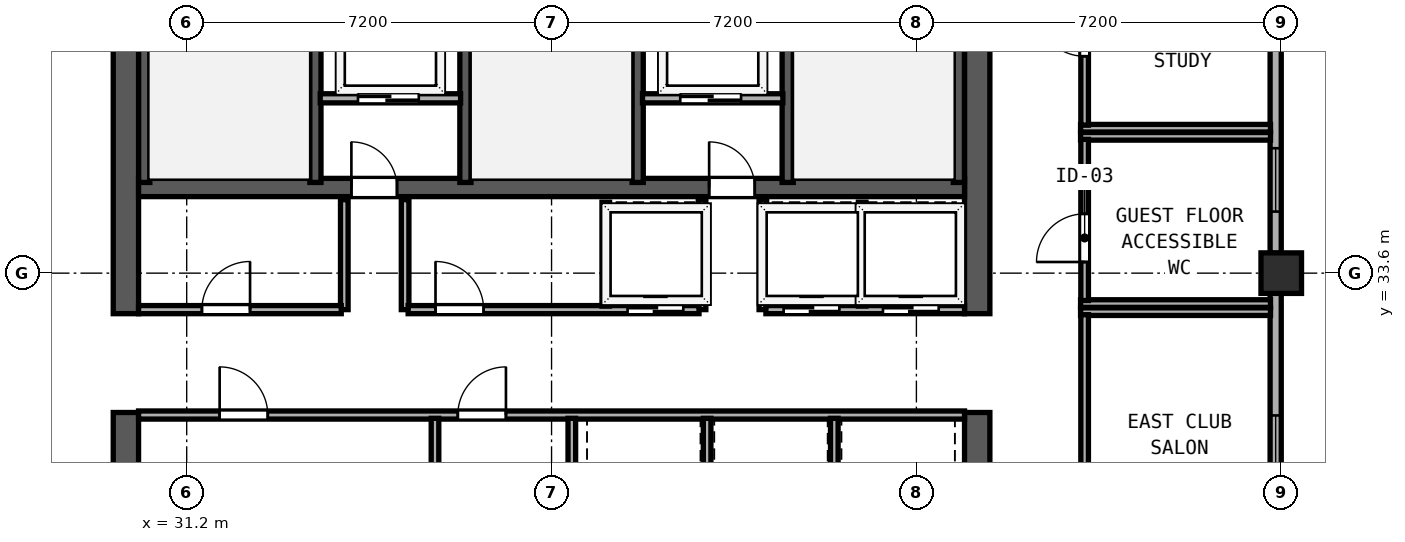
"""IFC4 building model, lengths in metres.
Left out: names, types, materials, properties, quantities, classifications, styles, units other than length and angle.
Written with IfcOpenShell. Run it as: python <this file> out.ifc"""

import sys

from ifc_helpers import new_model, si_unit, direction, frame, frame_2d, origin, origin_2d, place, context, subcontext, project, spatial, rectangle, hollow_rectangle, extrude, element, fill, save


model = new_model("IFC4")
c1 = context("Model", 3, precision=1e-05, world=origin(), true_north=direction((0.0, 1.0)))
c2 = subcontext(c1, "Body", "Model", "MODEL_VIEW")
j1 = project(units=[si_unit("LENGTHUNIT", "METRE"), si_unit("PLANEANGLEUNIT", "RADIAN")], contexts=[c1])
p1 = place(None, origin())
s1 = spatial("IfcSite", under=j1, at=p1, CompositionType="ELEMENT")
p2 = place(p1, origin())
s2 = spatial("IfcBuilding", under=s1, at=p2, CompositionType="ELEMENT")
p3 = place(p2, frame((0.0, 0.0, 258.3)))
s3 = spatial("IfcBuildingStorey", under=s2, at=p3, CompositionType="ELEMENT", Elevation=258.3)
p4 = place(p3, frame((30.0, 26.65, 0.0), z_axis=(0.0, 0.0, 1.0), x_axis=(0.0, 1.0, 0.0)))
e1 = element("IfcWall", 1, at=p4, inside=s3, PredefinedType="SHEAR", context=c2, shape_type="SweptSolid", body=[
    extrude(rectangle(XDim=4.2, YDim=0.5, at=frame_2d((2.1, 0.0))), origin(), (0.0, 0.0, 1.0), 3.67),
])
p5 = place(p3, frame((30.0, 32.8, 0.0), z_axis=(0.0, 0.0, 1.0), x_axis=(0.0, 1.0, 0.0)))
e2 = element("IfcWall", 2, at=p5, inside=s3, PredefinedType="SHEAR", context=c2, shape_type="SweptSolid", body=[
    extrude(rectangle(XDim=10.15, YDim=0.5, at=frame_2d((5.075, 0.0))), origin(), (0.0, 0.0, 1.0), 3.67),
])
p6 = place(p3, frame((46.8, 26.65, 0.0), z_axis=(0.0, 0.0, 1.0), x_axis=(0.0, 1.0, 0.0)))
e3 = element("IfcWall", 3, at=p6, inside=s3, PredefinedType="SHEAR", context=c2, shape_type="SweptSolid", body=[
    extrude(rectangle(XDim=4.2, YDim=0.5, at=frame_2d((2.1, 0.0))), origin(), (0.0, 0.0, 1.0), 3.67),
])
p7 = place(p3, frame((46.8, 32.8, 0.0), z_axis=(0.0, 0.0, 1.0), x_axis=(0.0, 1.0, 0.0)))
e4 = element("IfcWall", 4, at=p7, inside=s3, PredefinedType="SHEAR", context=c2, shape_type="SweptSolid", body=[
    extrude(rectangle(XDim=10.15, YDim=0.5, at=frame_2d((5.075, 0.0))), origin(), (0.0, 0.0, 1.0), 3.67),
])
p8 = place(p3, frame((30.25, 35.29, 0.0), z_axis=(0.0, 0.0, 1.0), x_axis=(1.0, 0.0, 0.0)))
e5 = element("IfcWall", 5, at=p8, inside=s3, PredefinedType="SHEAR", context=c2, shape_type="SweptSolid", body=[
    extrude(rectangle(XDim=16.3, YDim=0.36, at=frame_2d((8.15, 0.0))), origin(), (0.0, 0.0, 1.0), 3.67),
])
p9 = place(p8, frame((5.1, 0.0, 0.0), z_axis=(0.0, 0.0, 1.0), x_axis=(-1.0, 0.0, 0.0)))
e6 = element("IfcOpeningElement", 6, at=p9, cuts=e5, PredefinedType="OPENING", context=c2, shape_type="SweptSolid", body=[
    extrude(rectangle(XDim=0.9, YDim=2.1, at=frame_2d((0.45, 1.05))), frame((0.0, 0.19, 0.0), z_axis=(0.0, -1.0, 0.0), x_axis=(1.0, 0.0, 0.0)), (0.0, 0.0, 1.0), 0.38),
])
p10 = place(p8, frame((12.16, 0.0, 0.0), z_axis=(0.0, 0.0, 1.0), x_axis=(-1.0, 0.0, 0.0)))
e7 = element("IfcOpeningElement", 7, at=p10, cuts=e5, PredefinedType="OPENING", context=c2, shape_type="SweptSolid", body=[
    extrude(rectangle(XDim=0.9, YDim=2.1, at=frame_2d((0.45, 1.05))), frame((0.0, 0.19, 0.0), z_axis=(0.0, -1.0, 0.0), x_axis=(1.0, 0.0, 0.0)), (0.0, 0.0, 1.0), 0.38),
])
for number, where, z_axis, x_axis in (
    (8, (30.362, 35.39, 0.0), (0.0, 0.0, 1.0), (0.0, 1.0, 0.0)),
    (9, (33.74, 35.39, 0.0), (0.0, 0.0, 1.0), (0.0, 1.0, 0.0)),
    (10, (36.7, 35.39, 0.0), (0.0, 0.0, 1.0), (0.0, 1.0, 0.0)),
    (11, (40.1, 35.39, 0.0), (0.0, 0.0, 1.0), (0.0, 1.0, 0.0)),
    (12, (43.06, 35.39, 0.0), (0.0, 0.0, 1.0), (0.0, 1.0, 0.0)),
    (13, (46.438, 35.39, 0.0), (0.0, 0.0, 1.0), (0.0, 1.0, 0.0)),
):
    element("IfcWall", number, at=place(p3, frame(where, z_axis=z_axis, x_axis=x_axis)), inside=s3, PredefinedType="SHEAR", context=c2, shape_type="SweptSolid", body=[
        extrude(rectangle(XDim=7.56, YDim=0.22, at=frame_2d((3.78, 0.0))), origin(), (0.0, 0.0, 1.0), 3.67),
    ])
p11 = place(p3, frame((52.8, 33.6, 0.0), z_axis=(0.0, 0.0, 1.0), x_axis=(1.0, 0.0, 0.0)))
e14 = element("IfcColumn", 14, at=p11, inside=s3, PredefinedType="COLUMN", context=c2, shape_type="SweptSolid", body=[
    extrude(hollow_rectangle(XDim=0.8, YDim=0.8, WallThickness=0.03, at=origin_2d()), origin(), (0.0, 0.0, 1.0), 3.85),
])
p12 = place(p3, frame((52.69, 27.942, 0.0), z_axis=(0.0, 0.0, 1.0), x_axis=(0.0, 1.0, 0.0)))
e15 = element("IfcWall", 15, at=p12, inside=s3, PredefinedType="SOLIDWALL", context=c2, shape_type="SweptSolid", body=[
    extrude(rectangle(XDim=5.266, YDim=0.22, at=frame_2d((2.633, 0.0))), origin(), (0.0, 0.0, 1.0), 3.315),
])
p13 = place(p12, frame((1.6, 0.0, 0.85)))
e16 = element("IfcOpeningElement", 16, at=p13, cuts=e15, PredefinedType="OPENING", context=c2, shape_type="SweptSolid", body=[
    extrude(rectangle(XDim=1.25, YDim=1.95, at=frame_2d((0.625, 0.975))), frame((0.0, 0.12, 0.0), z_axis=(0.0, -1.0, 0.0), x_axis=(1.0, 0.0, 0.0)), (0.0, 0.0, 1.0), 0.24),
])
p14 = place(p3, frame((52.69, 33.992, 0.0), z_axis=(0.0, 0.0, 1.0), x_axis=(0.0, 1.0, 0.0)))
e17 = element("IfcWall", 17, at=p14, inside=s3, PredefinedType="SOLIDWALL", context=c2, shape_type="SweptSolid", body=[
    extrude(rectangle(XDim=5.266, YDim=0.22, at=frame_2d((2.633, 0.0))), origin(), (0.0, 0.0, 1.0), 3.315),
])
p15 = place(p14, frame((0.823, 0.0, 0.85)))
e18 = element("IfcOpeningElement", 18, at=p15, cuts=e17, PredefinedType="OPENING", context=c2, shape_type="SweptSolid", body=[
    extrude(rectangle(XDim=1.25, YDim=1.95, at=frame_2d((0.625, 0.975))), frame((0.0, 0.12, 0.0), z_axis=(0.0, -1.0, 0.0), x_axis=(1.0, 0.0, 0.0)), (0.0, 0.0, 1.0), 0.24),
])
p16 = place(p3, frame((33.835, 37.05, 0.0), z_axis=(0.0, 0.0, 1.0), x_axis=(1.0, 0.0, 0.0)))
e19 = element("IfcWall", 19, at=p16, inside=s3, PredefinedType="SOLIDWALL", context=c2, shape_type="SweptSolid", body=[
    extrude(rectangle(XDim=2.77, YDim=0.18, at=frame_2d((1.385, 0.0))), origin(), (0.0, 0.0, 1.0), 3.67),
])
p17 = place(p16, frame((1.945, 0.0, 0.0), z_axis=(0.0, 0.0, 1.0), x_axis=(-1.0, 0.0, 0.0)))
e20 = element("IfcOpeningElement", 20, at=p17, cuts=e19, PredefinedType="OPENING", context=c2, shape_type="SweptSolid", body=[
    extrude(rectangle(XDim=1.2, YDim=2.2, at=frame_2d((0.6, 1.1))), frame((0.0, 0.1, 0.0), z_axis=(0.0, -1.0, 0.0), x_axis=(1.0, 0.0, 0.0)), (0.0, 0.0, 1.0), 0.2),
])
for number, where, z_axis, x_axis in (
    (21, (34.31, 32.88, 0.0), (0.0, 0.0, 1.0), (0.0, 1.0, 0.0)),
    (22, (35.51, 32.88, 0.0), (0.0, 0.0, 1.0), (0.0, 1.0, 0.0)),
):
    element("IfcWall", number, at=place(p3, frame(where, z_axis=z_axis, x_axis=x_axis)), inside=s3, PredefinedType="SOLIDWALL", context=c2, shape_type="SweptSolid", body=[
        extrude(rectangle(XDim=2.17, YDim=0.15, at=frame_2d((1.085, 0.0))), origin(), (0.0, 0.0, 1.0), 3.67),
    ])
p18 = place(p3, frame((40.195, 37.05, 0.0), z_axis=(0.0, 0.0, 1.0), x_axis=(1.0, 0.0, 0.0)))
e23 = element("IfcWall", 23, at=p18, inside=s3, PredefinedType="SOLIDWALL", context=c2, shape_type="SweptSolid", body=[
    extrude(rectangle(XDim=2.77, YDim=0.18, at=frame_2d((1.385, 0.0))), origin(), (0.0, 0.0, 1.0), 3.67),
])
p19 = place(p18, frame((1.945, 0.0, 0.0), z_axis=(0.0, 0.0, 1.0), x_axis=(-1.0, 0.0, 0.0)))
e24 = element("IfcOpeningElement", 24, at=p19, cuts=e23, PredefinedType="OPENING", context=c2, shape_type="SweptSolid", body=[
    extrude(rectangle(XDim=1.2, YDim=2.2, at=frame_2d((0.6, 1.1))), frame((0.0, 0.1, 0.0), z_axis=(0.0, -1.0, 0.0), x_axis=(1.0, 0.0, 0.0)), (0.0, 0.0, 1.0), 0.2),
])
for number, where, z_axis, x_axis in (
    (25, (41.37, 32.88, 0.0), (0.0, 0.0, 1.0), (0.0, 1.0, 0.0)),
    (26, (42.57, 32.88, 0.0), (0.0, 0.0, 1.0), (0.0, 1.0, 0.0)),
):
    element("IfcWall", number, at=place(p3, frame(where, z_axis=z_axis, x_axis=x_axis)), inside=s3, PredefinedType="SOLIDWALL", context=c2, shape_type="SweptSolid", body=[
        extrude(rectangle(XDim=2.17, YDim=0.15, at=frame_2d((1.085, 0.0))), origin(), (0.0, 0.0, 1.0), 3.67),
    ])
p20 = place(p3, frame((30.25, 32.88, 0.0), z_axis=(0.0, 0.0, 1.0), x_axis=(1.0, 0.0, 0.0)))
e27 = element("IfcWall", 27, at=p20, inside=s3, PredefinedType="SOLIDWALL", context=c2, shape_type="SweptSolid", body=[
    extrude(rectangle(XDim=4.0, YDim=0.16, at=frame_2d((2.0, 0.0))), origin(), (0.0, 0.0, 1.0), 3.67),
])
p21 = place(p20, frame((2.2, 0.0, 0.0), z_axis=(0.0, 0.0, 1.0), x_axis=(-1.0, 0.0, 0.0)))
e28 = element("IfcOpeningElement", 28, at=p21, cuts=e27, PredefinedType="OPENING", context=c2, shape_type="SweptSolid", body=[
    extrude(rectangle(XDim=0.95, YDim=2.12, at=frame_2d((0.475, 1.06))), frame((0.0, 0.09, 0.0), z_axis=(0.0, -1.0, 0.0), x_axis=(1.0, 0.0, 0.0)), (0.0, 0.0, 1.0), 0.18),
])
p22 = place(p3, frame((35.57, 32.88, 0.0), z_axis=(0.0, 0.0, 1.0), x_axis=(1.0, 0.0, 0.0)))
e29 = element("IfcWall", 29, at=p22, inside=s3, PredefinedType="SOLIDWALL", context=c2, shape_type="SweptSolid", body=[
    extrude(rectangle(XDim=5.74, YDim=0.16, at=frame_2d((2.87, 0.0))), origin(), (0.0, 0.0, 1.0), 3.67),
])
p23 = place(p22, frame((1.49, 0.0, 0.0), z_axis=(0.0, 0.0, 1.0), x_axis=(-1.0, 0.0, 0.0)))
e30 = element("IfcOpeningElement", 30, at=p23, cuts=e29, PredefinedType="OPENING", context=c2, shape_type="SweptSolid", body=[
    extrude(rectangle(XDim=0.95, YDim=2.12, at=frame_2d((0.475, 1.06))), frame((0.0, 0.09, 0.0), z_axis=(0.0, -1.0, 0.0), x_axis=(1.0, 0.0, 0.0)), (0.0, 0.0, 1.0), 0.18),
])
p24 = place(p22, frame((5.43, 0.0, 0.0), z_axis=(0.0, 0.0, 1.0), x_axis=(-1.0, 0.0, 0.0)))
e31 = element("IfcOpeningElement", 31, at=p24, cuts=e29, PredefinedType="OPENING", context=c2, shape_type="SweptSolid", body=[
    extrude(rectangle(XDim=1.1, YDim=2.2, at=frame_2d((0.55, 1.1))), frame((0.0, 0.09, 0.0), z_axis=(0.0, -1.0, 0.0), x_axis=(1.0, 0.0, 0.0)), (0.0, 0.0, 1.0), 0.18),
])
p25 = place(p3, frame((42.63, 32.88, 0.0), z_axis=(0.0, 0.0, 1.0), x_axis=(1.0, 0.0, 0.0)))
e32 = element("IfcWall", 32, at=p25, inside=s3, PredefinedType="SOLIDWALL", context=c2, shape_type="SweptSolid", body=[
    extrude(rectangle(XDim=3.92, YDim=0.16, at=frame_2d((1.96, 0.0))), origin(), (0.0, 0.0, 1.0), 3.67),
])
p26 = place(p25, frame((1.45, 0.0, 0.0), z_axis=(0.0, 0.0, 1.0), x_axis=(-1.0, 0.0, 0.0)))
e33 = element("IfcOpeningElement", 33, at=p26, cuts=e32, PredefinedType="OPENING", context=c2, shape_type="SweptSolid", body=[
    extrude(rectangle(XDim=1.1, YDim=2.2, at=frame_2d((0.55, 1.1))), frame((0.0, 0.09, 0.0), z_axis=(0.0, -1.0, 0.0), x_axis=(1.0, 0.0, 0.0)), (0.0, 0.0, 1.0), 0.18),
])
p27 = place(p25, frame((3.41, 0.0, 0.0), z_axis=(0.0, 0.0, 1.0), x_axis=(-1.0, 0.0, 0.0)))
e34 = element("IfcOpeningElement", 34, at=p27, cuts=e32, PredefinedType="OPENING", context=c2, shape_type="SweptSolid", body=[
    extrude(rectangle(XDim=1.1, YDim=2.2, at=frame_2d((0.55, 1.1))), frame((0.0, 0.09, 0.0), z_axis=(0.0, -1.0, 0.0), x_axis=(1.0, 0.0, 0.0)), (0.0, 0.0, 1.0), 0.18),
])
for number, where, z_axis, x_axis in (
    (35, (39.47, 32.95, 0.0), (0.0, 0.0, 1.0), (0.0, 1.0, 0.0)),
    (36, (44.53, 32.95, 0.0), (0.0, 0.0, 1.0), (0.0, 1.0, 0.0)),
):
    element("IfcWall", number, at=place(p3, frame(where, z_axis=z_axis, x_axis=x_axis)), inside=s3, PredefinedType="SOLIDWALL", context=c2, shape_type="SweptSolid", body=[
        extrude(rectangle(XDim=2.05, YDim=0.15, at=frame_2d((1.025, 0.0))), origin(), (0.0, 0.0, 1.0), 3.67),
    ])
p28 = place(p3, frame((30.25, 30.8, 0.0), z_axis=(0.0, 0.0, 1.0), x_axis=(1.0, 0.0, 0.0)))
e37 = element("IfcWall", 37, at=p28, inside=s3, PredefinedType="SOLIDWALL", context=c2, shape_type="SweptSolid", body=[
    extrude(rectangle(XDim=16.3, YDim=0.16, at=frame_2d((8.15, 0.0))), origin(), (0.0, 0.0, 1.0), 3.67),
])
p29 = place(p28, frame((1.6, 0.0, 0.0)))
e38 = element("IfcOpeningElement", 38, at=p29, cuts=e37, PredefinedType="OPENING", context=c2, shape_type="SweptSolid", body=[
    extrude(rectangle(XDim=0.95, YDim=2.12, at=frame_2d((0.475, 1.06))), frame((0.0, 0.09, 0.0), z_axis=(0.0, -1.0, 0.0), x_axis=(1.0, 0.0, 0.0)), (0.0, 0.0, 1.0), 0.18),
])
p30 = place(p28, frame((6.3, 0.0, 0.0)))
e39 = element("IfcOpeningElement", 39, at=p30, cuts=e37, PredefinedType="OPENING", context=c2, shape_type="SweptSolid", body=[
    extrude(rectangle(XDim=0.95, YDim=2.12, at=frame_2d((0.475, 1.06))), frame((0.0, 0.09, 0.0), z_axis=(0.0, -1.0, 0.0), x_axis=(1.0, 0.0, 0.0)), (0.0, 0.0, 1.0), 0.18),
])
p31 = place(p3, frame((38.8, 26.66, 0.0), z_axis=(0.0, 0.0, 1.0), x_axis=(0.0, 1.0, 0.0)))
e40 = element("IfcWall", 40, at=p31, inside=s3, PredefinedType="SOLIDWALL", context=c2, shape_type="SweptSolid", body=[
    extrude(rectangle(XDim=4.075, YDim=0.15, at=frame_2d((2.038, 0.0))), origin(), (0.0, 0.0, 1.0), 3.67),
])
p32 = place(p3, frame((36.1, 26.66, 0.0), z_axis=(0.0, 0.0, 1.0), x_axis=(0.0, 1.0, 0.0)))
e41 = element("IfcWall", 41, at=p32, inside=s3, PredefinedType="PARTITIONING", context=c2, shape_type="SweptSolid", body=[
    extrude(rectangle(XDim=4.075, YDim=0.15, at=frame_2d((2.038, 0.0))), origin(), (0.0, 0.0, 1.0), 3.67),
])
for number, where, z_axis, x_axis in (
    (42, (41.47, 28.75, 0.0), (0.0, 0.0, 1.0), (0.0, 1.0, 0.0)),
    (43, (43.98, 28.75, 0.0), (0.0, 0.0, 1.0), (0.0, 1.0, 0.0)),
):
    element("IfcWall", number, at=place(p3, frame(where, z_axis=z_axis, x_axis=x_axis)), inside=s3, PredefinedType="SOLIDWALL", context=c2, shape_type="SweptSolid", body=[
        extrude(rectangle(XDim=1.985, YDim=0.15, at=frame_2d((0.993, 0.0))), origin(), (0.0, 0.0, 1.0), 3.67),
    ])
for number, where, z_axis, x_axis in (
    (44, (48.84, 36.3, 0.0), (0.0, 0.0, 1.0), (1.0, 0.0, 0.0)),
    (45, (48.84, 33.0, 0.0), (0.0, 0.0, 1.0), (1.0, 0.0, 0.0)),
):
    element("IfcWall", number, at=place(p3, frame(where, z_axis=z_axis, x_axis=x_axis)), inside=s3, PredefinedType="PARTITIONING", context=c2, shape_type="SweptSolid", body=[
        extrude(rectangle(XDim=3.748, YDim=0.15, at=frame_2d((1.874, 0.0))), origin(), (0.0, 0.0, 1.0), 3.67),
    ])
p33 = place(p3, frame((48.92, 33.06, 0.0), z_axis=(0.0, 0.0, 1.0), x_axis=(0.0, 1.0, 0.0)))
e46 = element("IfcWall", 46, at=p33, inside=s3, PredefinedType="PARTITIONING", context=c2, shape_type="SweptSolid", body=[
    extrude(rectangle(XDim=3.18, YDim=0.15, at=frame_2d((1.59, 0.0))), origin(), (0.0, 0.0, 1.0), 3.67),
])
p34 = place(p33, frame((0.76, 0.0, 0.0)))
e47 = element("IfcOpeningElement", 47, at=p34, cuts=e46, PredefinedType="OPENING", context=c2, shape_type="SweptSolid", body=[
    extrude(rectangle(XDim=0.95, YDim=2.12, at=frame_2d((0.475, 1.06))), frame((0.0, 0.085, 0.0), z_axis=(0.0, -1.0, 0.0), x_axis=(1.0, 0.0, 0.0)), (0.0, 0.0, 1.0), 0.17),
])
p35 = place(p3, frame((48.84, 36.46, 0.0), z_axis=(0.0, 0.0, 1.0), x_axis=(1.0, 0.0, 0.0)))
e48 = element("IfcWall", 48, at=p35, inside=s3, PredefinedType="PARTITIONING", context=c2, shape_type="SweptSolid", body=[
    extrude(rectangle(XDim=3.748, YDim=0.15, at=frame_2d((1.874, 0.0))), origin(), (0.0, 0.0, 1.0), 3.67),
])
p36 = place(p3, frame((48.92, 36.52, 0.0), z_axis=(0.0, 0.0, 1.0), x_axis=(0.0, 1.0, 0.0)))
e49 = element("IfcWall", 49, at=p36, inside=s3, PredefinedType="PARTITIONING", context=c2, shape_type="SweptSolid", body=[
    extrude(rectangle(XDim=4.62, YDim=0.15, at=frame_2d((2.31, 0.0))), origin(), (0.0, 0.0, 1.0), 3.67),
])
p37 = place(p36, frame((1.36, 0.0, 0.0)))
e50 = element("IfcOpeningElement", 50, at=p37, cuts=e49, PredefinedType="OPENING", context=c2, shape_type="SweptSolid", body=[
    extrude(rectangle(XDim=0.95, YDim=2.12, at=frame_2d((0.475, 1.06))), frame((0.0, 0.085, 0.0), z_axis=(0.0, -1.0, 0.0), x_axis=(1.0, 0.0, 0.0)), (0.0, 0.0, 1.0), 0.17),
])
p38 = place(p3, frame((48.84, 32.84, 0.0), z_axis=(0.0, 0.0, 1.0), x_axis=(1.0, 0.0, 0.0)))
e51 = element("IfcWall", 51, at=p38, inside=s3, PredefinedType="PARTITIONING", context=c2, shape_type="SweptSolid", body=[
    extrude(rectangle(XDim=3.748, YDim=0.15, at=frame_2d((1.874, 0.0))), origin(), (0.0, 0.0, 1.0), 3.67),
])
p39 = place(p3, frame((48.92, 26.41, 0.0), z_axis=(0.0, 0.0, 1.0), x_axis=(0.0, 1.0, 0.0)))
e52 = element("IfcWall", 52, at=p39, inside=s3, PredefinedType="PARTITIONING", context=c2, shape_type="SweptSolid", body=[
    extrude(rectangle(XDim=6.37, YDim=0.15, at=frame_2d((3.185, 0.0))), origin(), (0.0, 0.0, 1.0), 3.67),
])
p40 = place(p39, frame((0.86, 0.0, 0.0)))
e53 = element("IfcOpeningElement", 53, at=p40, cuts=e52, PredefinedType="OPENING", context=c2, shape_type="SweptSolid", body=[
    extrude(rectangle(XDim=0.95, YDim=2.12, at=frame_2d((0.475, 1.06))), frame((0.0, 0.085, 0.0), z_axis=(0.0, -1.0, 0.0), x_axis=(1.0, 0.0, 0.0)), (0.0, 0.0, 1.0), 0.17),
])
p41 = place(p13, origin())
e54 = element("IfcWindow", 54, at=p41, inside=s3, PartitioningType="SINGLE_PANEL", PredefinedType="WINDOW", context=c2, shape_type="SweptSolid", body=[
    extrude(rectangle(XDim=1.25, YDim=1.95, at=frame_2d((0.625, 0.975))), frame((0.0, 0.03, 0.0), z_axis=(0.0, -1.0, 0.0), x_axis=(1.0, 0.0, 0.0)), (0.0, 0.0, 1.0), 0.06),
])
fill(e16, e54)
p42 = place(p15, origin())
e55 = element("IfcWindow", 55, at=p42, inside=s3, PartitioningType="SINGLE_PANEL", PredefinedType="WINDOW", context=c2, shape_type="SweptSolid", body=[
    extrude(rectangle(XDim=1.25, YDim=1.95, at=frame_2d((0.625, 0.975))), frame((0.0, 0.03, 0.0), z_axis=(0.0, -1.0, 0.0), x_axis=(1.0, 0.0, 0.0)), (0.0, 0.0, 1.0), 0.06),
])
fill(e18, e55)
p43 = place(p17, origin())
e56 = element("IfcDoor", 56, at=p43, inside=s3, OperationType="SLIDING_TO_RIGHT", PredefinedType="DOOR", context=c2, shape_type="SweptSolid", body=[
    extrude(rectangle(XDim=1.2, YDim=2.2, at=frame_2d((0.6, 1.1))), frame((0.0, 0.025, 0.0), z_axis=(0.0, -1.0, 0.0), x_axis=(1.0, 0.0, 0.0)), (0.0, 0.0, 1.0), 0.05),
])
fill(e20, e56)
p44 = place(p9, origin())
e57 = element("IfcDoor", 57, at=p44, inside=s3, OperationType="SINGLE_SWING_RIGHT", PredefinedType="DOOR", context=c2, shape_type="SweptSolid", body=[
    extrude(rectangle(XDim=0.9, YDim=2.1, at=frame_2d((0.45, 1.05))), frame((0.0, 0.025, 0.0), z_axis=(0.0, -1.0, 0.0), x_axis=(1.0, 0.0, 0.0)), (0.0, 0.0, 1.0), 0.05),
])
fill(e6, e57)
p45 = place(p19, origin())
e58 = element("IfcDoor", 58, at=p45, inside=s3, OperationType="SLIDING_TO_RIGHT", PredefinedType="DOOR", context=c2, shape_type="SweptSolid", body=[
    extrude(rectangle(XDim=1.2, YDim=2.2, at=frame_2d((0.6, 1.1))), frame((0.0, 0.025, 0.0), z_axis=(0.0, -1.0, 0.0), x_axis=(1.0, 0.0, 0.0)), (0.0, 0.0, 1.0), 0.05),
])
fill(e24, e58)
p46 = place(p10, origin())
e59 = element("IfcDoor", 59, at=p46, inside=s3, OperationType="SINGLE_SWING_RIGHT", PredefinedType="DOOR", context=c2, shape_type="SweptSolid", body=[
    extrude(rectangle(XDim=0.9, YDim=2.1, at=frame_2d((0.45, 1.05))), frame((0.0, 0.025, 0.0), z_axis=(0.0, -1.0, 0.0), x_axis=(1.0, 0.0, 0.0)), (0.0, 0.0, 1.0), 0.05),
])
fill(e7, e59)
p47 = place(p21, origin())
e60 = element("IfcDoor", 60, at=p47, inside=s3, OperationType="SINGLE_SWING_LEFT", PredefinedType="DOOR", context=c2, shape_type="SweptSolid", body=[
    extrude(rectangle(XDim=0.95, YDim=2.12, at=frame_2d((0.475, 1.06))), frame((0.0, 0.025, 0.0), z_axis=(0.0, -1.0, 0.0), x_axis=(1.0, 0.0, 0.0)), (0.0, 0.0, 1.0), 0.05),
])
fill(e28, e60)
p48 = place(p23, origin())
e61 = element("IfcDoor", 61, at=p48, inside=s3, OperationType="SINGLE_SWING_RIGHT", PredefinedType="DOOR", context=c2, shape_type="SweptSolid", body=[
    extrude(rectangle(XDim=0.95, YDim=2.12, at=frame_2d((0.475, 1.06))), frame((0.0, 0.025, 0.0), z_axis=(0.0, -1.0, 0.0), x_axis=(1.0, 0.0, 0.0)), (0.0, 0.0, 1.0), 0.05),
])
fill(e30, e61)
p49 = place(p24, origin())
e62 = element("IfcDoor", 62, at=p49, inside=s3, OperationType="SLIDING_TO_RIGHT", PredefinedType="DOOR", context=c2, shape_type="SweptSolid", body=[
    extrude(rectangle(XDim=1.1, YDim=2.2, at=frame_2d((0.55, 1.1))), frame((0.0, 0.025, 0.0), z_axis=(0.0, -1.0, 0.0), x_axis=(1.0, 0.0, 0.0)), (0.0, 0.0, 1.0), 0.05),
])
fill(e31, e62)
p50 = place(p26, origin())
e63 = element("IfcDoor", 63, at=p50, inside=s3, OperationType="SLIDING_TO_RIGHT", PredefinedType="DOOR", context=c2, shape_type="SweptSolid", body=[
    extrude(rectangle(XDim=1.1, YDim=2.2, at=frame_2d((0.55, 1.1))), frame((0.0, 0.025, 0.0), z_axis=(0.0, -1.0, 0.0), x_axis=(1.0, 0.0, 0.0)), (0.0, 0.0, 1.0), 0.05),
])
fill(e33, e63)
p51 = place(p27, origin())
e64 = element("IfcDoor", 64, at=p51, inside=s3, OperationType="SLIDING_TO_RIGHT", PredefinedType="DOOR", context=c2, shape_type="SweptSolid", body=[
    extrude(rectangle(XDim=1.1, YDim=2.2, at=frame_2d((0.55, 1.1))), frame((0.0, 0.025, 0.0), z_axis=(0.0, -1.0, 0.0), x_axis=(1.0, 0.0, 0.0)), (0.0, 0.0, 1.0), 0.05),
])
fill(e34, e64)
p52 = place(p29, origin())
e65 = element("IfcDoor", 65, at=p52, inside=s3, OperationType="SINGLE_SWING_LEFT", PredefinedType="DOOR", context=c2, shape_type="SweptSolid", body=[
    extrude(rectangle(XDim=0.95, YDim=2.12, at=frame_2d((0.475, 1.06))), frame((0.0, 0.025, 0.0), z_axis=(0.0, -1.0, 0.0), x_axis=(1.0, 0.0, 0.0)), (0.0, 0.0, 1.0), 0.05),
])
fill(e38, e65)
p53 = place(p30, origin())
e66 = element("IfcDoor", 66, at=p53, inside=s3, OperationType="SINGLE_SWING_RIGHT", PredefinedType="DOOR", context=c2, shape_type="SweptSolid", body=[
    extrude(rectangle(XDim=0.95, YDim=2.12, at=frame_2d((0.475, 1.06))), frame((0.0, 0.025, 0.0), z_axis=(0.0, -1.0, 0.0), x_axis=(1.0, 0.0, 0.0)), (0.0, 0.0, 1.0), 0.05),
])
fill(e39, e66)
p54 = place(p34, origin())
e67 = element("IfcDoor", 67, at=p54, inside=s3, OperationType="SINGLE_SWING_LEFT", PredefinedType="DOOR", context=c2, shape_type="SweptSolid", body=[
    extrude(rectangle(XDim=0.95, YDim=2.12, at=frame_2d((0.475, 1.06))), frame((0.0, 0.025, 0.0), z_axis=(0.0, -1.0, 0.0), x_axis=(1.0, 0.0, 0.0)), (0.0, 0.0, 1.0), 0.05),
])
fill(e47, e67)
p55 = place(p37, origin())
e68 = element("IfcDoor", 68, at=p55, inside=s3, OperationType="SINGLE_SWING_RIGHT", PredefinedType="DOOR", context=c2, shape_type="SweptSolid", body=[
    extrude(rectangle(XDim=0.95, YDim=2.12, at=frame_2d((0.475, 1.06))), frame((0.0, 0.025, 0.0), z_axis=(0.0, -1.0, 0.0), x_axis=(1.0, 0.0, 0.0)), (0.0, 0.0, 1.0), 0.05),
])
fill(e50, e68)
save(model, sys.argv[1])
